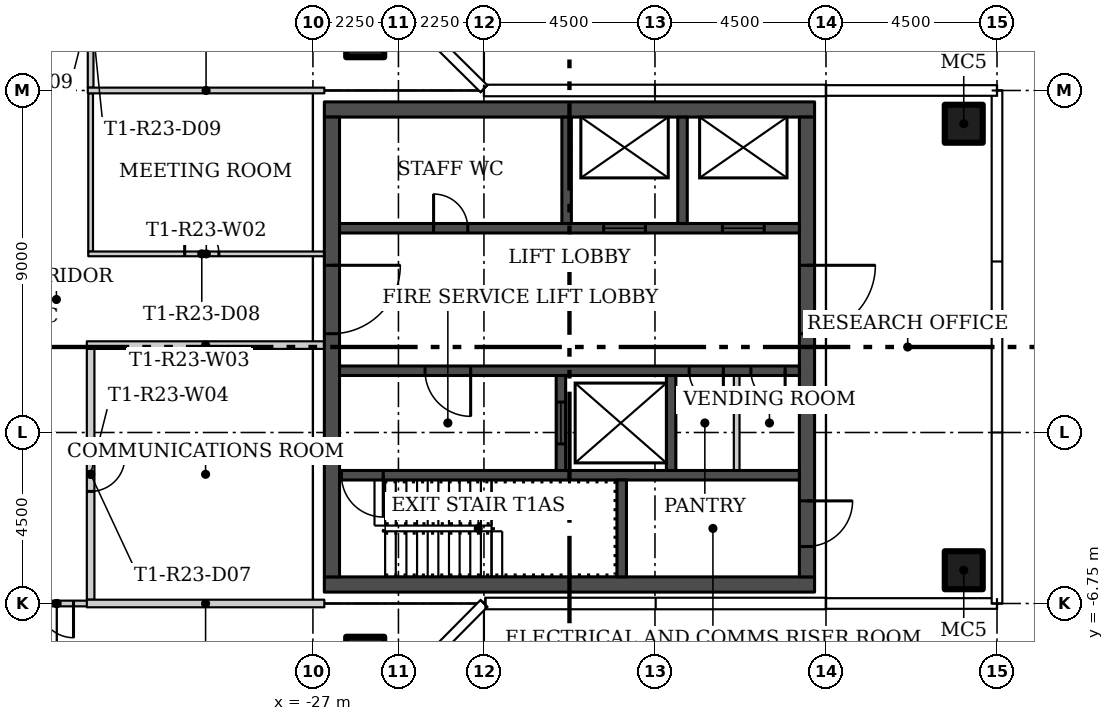
"""IFC4 building model, lengths in metres.
Left out: names, types, materials, properties, quantities, classifications, styles, units other than length and angle.
Written with IfcOpenShell. Run it as: python <this file> out.ifc"""

import sys

from ifc_helpers import new_model, si_unit, direction, frame, frame_2d, origin, origin_2d, place, context, subcontext, project, spatial, rectangle, hollow_rectangle, extrude, element, fill, save


model = new_model("IFC4")
c1 = context("Model", 3, precision=1e-05, world=origin(), true_north=direction((0.0, 1.0)))
c2 = subcontext(c1, "Body", "Model", "MODEL_VIEW")
j1 = project(units=[si_unit("LENGTHUNIT", "METRE"), si_unit("PLANEANGLEUNIT", "RADIAN")], contexts=[c1])
p1 = place(None, origin())
s1 = spatial("IfcSite", under=j1, at=p1, CompositionType="ELEMENT")
p2 = place(p1, origin())
s2 = spatial("IfcBuilding", under=s1, at=p2, CompositionType="ELEMENT")
p3 = place(p2, frame((0.0, 0.0, 210.0)))
s3 = spatial("IfcBuildingStorey", under=s2, at=p3, CompositionType="ELEMENT", Elevation=210.0)
for number, where in (
    (1, (-25.625, 8.125, 0.0)),
    (2, (-25.625, -8.125, 0.0)),
    (3, (-9.875, -5.875, 0.0)),
    (4, (-9.875, 5.875, 0.0)),
):
    element("IfcColumn", number, at=place(p3, frame(where)), inside=s3, PredefinedType="COLUMN", context=c2, shape_type="SweptSolid", body=[
        extrude(hollow_rectangle(XDim=1.0, YDim=1.0, WallThickness=0.04, at=origin_2d()), origin(), (0.0, 0.0, 1.0), 3.55),
    ])
p4 = place(p3, frame((-32.85, 6.675, 0.0), z_axis=(0.0, 0.0, 1.0), x_axis=(0.0, -1.0, 0.0)))
e5 = element("IfcWall", 5, at=p4, inside=s3, PredefinedType="PARTITIONING", context=c2, shape_type="SweptSolid", body=[
    extrude(rectangle(XDim=4.162, YDim=0.125, at=frame_2d((2.081, 0.0))), origin(), (0.0, 0.0, 1.0), 3.55),
])
p5 = place(p3, frame((-32.912, 2.45, 0.0)))
e6 = element("IfcWall", 6, at=p5, inside=s3, PredefinedType="PARTITIONING", context=c2, shape_type="SweptSolid", body=[
    extrude(rectangle(XDim=6.212, YDim=0.125, at=frame_2d((3.106, 0.0))), origin(), (0.0, 0.0, 1.0), 3.55),
])
p6 = place(p5, frame((2.537, 0.0, 0.0)))
e7 = element("IfcOpeningElement", 7, at=p6, cuts=e6, PredefinedType="OPENING", context=c2, shape_type="SweptSolid", body=[
    extrude(rectangle(XDim=0.9, YDim=2.1, at=frame_2d((0.45, 1.05))), frame((0.0, 0.073, 0.0), z_axis=(0.0, -1.0, 0.0), x_axis=(1.0, 0.0, 0.0)), (0.0, 0.0, 1.0), 0.145),
])
p7 = place(p3, frame((-26.7, 0.05, 0.0), z_axis=(0.0, 0.0, 1.0), x_axis=(-1.0, 0.0, 0.0)))
e8 = element("IfcWall", 8, at=p7, inside=s3, PredefinedType="PARTITIONING", context=c2, shape_type="SweptSolid", body=[
    extrude(rectangle(XDim=6.25, YDim=0.2, at=frame_2d((3.125, 0.0))), origin(), (0.0, 0.0, 1.0), 3.55),
])
p8 = place(p3, frame((-32.85, -0.05, 0.0), z_axis=(0.0, 0.0, 1.0), x_axis=(0.0, -1.0, 0.0)))
e9 = element("IfcWall", 9, at=p8, inside=s3, PredefinedType="PARTITIONING", context=c2, shape_type="SweptSolid", body=[
    extrude(rectangle(XDim=6.6, YDim=0.2, at=frame_2d((3.3, 0.0))), origin(), (0.0, 0.0, 1.0), 3.55),
])
p9 = place(p8, frame((2.85, 0.0, 0.0)))
e10 = element("IfcOpeningElement", 10, at=p9, cuts=e9, PredefinedType="OPENING", context=c2, shape_type="SweptSolid", body=[
    extrude(rectangle(XDim=0.9, YDim=2.1, at=frame_2d((0.45, 1.05))), frame((0.0, 0.11, 0.0), z_axis=(0.0, -1.0, 0.0), x_axis=(1.0, 0.0, 0.0)), (0.0, 0.0, 1.0), 0.22),
])
p10 = place(p3, frame((-32.85, 11.175, 0.0), z_axis=(0.0, 0.0, 1.0), x_axis=(0.0, -1.0, 0.0)))
e11 = element("IfcWall", 11, at=p10, inside=s3, PredefinedType="PARTITIONING", context=c2, shape_type="SweptSolid", body=[
    extrude(rectangle(XDim=4.35, YDim=0.15, at=frame_2d((2.175, 0.0))), origin(), (0.0, 0.0, 1.0), 3.55),
])
p11 = place(p10, frame((1.725, 0.0, 0.0)))
e12 = element("IfcOpeningElement", 12, at=p11, cuts=e11, PredefinedType="OPENING", context=c2, shape_type="SweptSolid", body=[
    extrude(rectangle(XDim=0.9, YDim=2.1, at=frame_2d((0.45, 1.05))), frame((0.0, 0.085, 0.0), z_axis=(0.0, -1.0, 0.0), x_axis=(1.0, 0.0, 0.0)), (0.0, 0.0, 1.0), 0.17),
])
p12 = place(p3, frame((-32.75, -6.75, 0.0), z_axis=(0.0, 0.0, 1.0), x_axis=(-1.0, 0.0, 0.0)))
e13 = element("IfcWall", 13, at=p12, inside=s3, PredefinedType="PARTITIONING", context=c2, shape_type="SweptSolid", body=[
    extrude(rectangle(XDim=1.963, YDim=0.15, at=frame_2d((0.982, 0.0))), origin(), (0.0, 0.0, 1.0), 3.55),
])
p13 = place(p12, frame((0.55, 0.0, 0.0)))
e14 = element("IfcOpeningElement", 14, at=p13, cuts=e13, PredefinedType="OPENING", context=c2, shape_type="SweptSolid", body=[
    extrude(rectangle(XDim=0.9, YDim=2.1, at=frame_2d((0.45, 1.05))), frame((0.0, 0.085, 0.0), z_axis=(0.0, -1.0, 0.0), x_axis=(1.0, 0.0, 0.0)), (0.0, 0.0, 1.0), 0.17),
])
p14 = place(p3, frame((-26.7, 6.75, 0.0), z_axis=(0.0, 0.0, 1.0), x_axis=(-1.0, 0.0, 0.0)))
e15 = element("IfcWall", 15, at=p14, inside=s3, PredefinedType="PARTITIONING", context=c2, shape_type="SweptSolid", body=[
    extrude(rectangle(XDim=6.225, YDim=0.15, at=frame_2d((3.112, 0.0))), origin(), (0.0, 0.0, 1.0), 3.55),
])
p15 = place(p3, frame((-32.95, -6.75, 0.0)))
e16 = element("IfcWall", 16, at=p15, inside=s3, PredefinedType="PARTITIONING", context=c2, shape_type="SweptSolid", body=[
    extrude(rectangle(XDim=6.25, YDim=0.2, at=frame_2d((3.125, 0.0))), origin(), (0.0, 0.0, 1.0), 3.55),
])
for number, where in (
    (17, (-26.7, -6.25, 0.0)),
    (18, (-26.7, 6.25, 0.0)),
):
    element("IfcWall", number, at=place(p3, frame(where)), inside=s3, PredefinedType="SHEAR", context=c2, shape_type="SweptSolid", body=[
        extrude(rectangle(XDim=12.9, YDim=0.4, at=frame_2d((6.45, 0.0))), origin(), (0.0, 0.0, 1.0), 3.55),
    ])
p16 = place(p3, frame((-26.5, 6.05, 0.0), z_axis=(0.0, 0.0, 1.0), x_axis=(0.0, -1.0, 0.0)))
e19 = element("IfcWall", 19, at=p16, inside=s3, PredefinedType="SHEAR", context=c2, shape_type="SweptSolid", body=[
    extrude(rectangle(XDim=12.1, YDim=0.4, at=frame_2d((6.05, 0.0))), origin(), (0.0, 0.0, 1.0), 3.55),
])
p17 = place(p16, frame((3.9, 0.0, 0.0)))
e20 = element("IfcOpeningElement", 20, at=p17, cuts=e19, PredefinedType="OPENING", context=c2, shape_type="SweptSolid", body=[
    extrude(rectangle(XDim=1.8, YDim=2.4, at=frame_2d((0.9, 1.2))), frame((0.0, 0.21, 0.0), z_axis=(0.0, -1.0, 0.0), x_axis=(1.0, 0.0, 0.0)), (0.0, 0.0, 1.0), 0.42),
])
p18 = place(p3, frame((-14.0, 6.05, 0.0), z_axis=(0.0, 0.0, 1.0), x_axis=(0.0, -1.0, 0.0)))
e21 = element("IfcWall", 21, at=p18, inside=s3, PredefinedType="SHEAR", context=c2, shape_type="SweptSolid", body=[
    extrude(rectangle(XDim=12.1, YDim=0.4, at=frame_2d((6.05, 0.0))), origin(), (0.0, 0.0, 1.0), 3.55),
])
p19 = place(p18, frame((10.1, 0.0, 0.0)))
e22 = element("IfcOpeningElement", 22, at=p19, cuts=e21, PredefinedType="OPENING", context=c2, shape_type="SweptSolid", body=[
    extrude(rectangle(XDim=1.2, YDim=2.1, at=frame_2d((0.6, 1.05))), frame((0.0, 0.21, 0.0), z_axis=(0.0, -1.0, 0.0), x_axis=(1.0, 0.0, 0.0)), (0.0, 0.0, 1.0), 0.42),
])
p20 = place(p18, frame((3.9, 0.0, 0.0)))
e23 = element("IfcOpeningElement", 23, at=p20, cuts=e21, PredefinedType="OPENING", context=c2, shape_type="SweptSolid", body=[
    extrude(rectangle(XDim=1.8, YDim=2.4, at=frame_2d((0.9, 1.2))), frame((0.0, 0.21, 0.0), z_axis=(0.0, -1.0, 0.0), x_axis=(1.0, 0.0, 0.0)), (0.0, 0.0, 1.0), 0.42),
])
p21 = place(p3, frame((-14.2, -3.375, 0.0), z_axis=(0.0, 0.0, 1.0), x_axis=(-1.0, 0.0, 0.0)))
e24 = element("IfcWall", 24, at=p21, inside=s3, PredefinedType="SHEAR", context=c2, shape_type="SweptSolid", body=[
    extrude(rectangle(XDim=12.1, YDim=0.25, at=frame_2d((6.05, 0.0))), origin(), (0.0, 0.0, 1.0), 3.55),
])
p22 = place(p21, frame((10.95, 0.0, 0.0)))
e25 = element("IfcOpeningElement", 25, at=p22, cuts=e24, PredefinedType="OPENING", context=c2, shape_type="SweptSolid", body=[
    extrude(rectangle(XDim=1.1, YDim=2.1, at=frame_2d((0.55, 1.05))), frame((0.0, 0.135, 0.0), z_axis=(0.0, -1.0, 0.0), x_axis=(1.0, 0.0, 0.0)), (0.0, 0.0, 1.0), 0.27),
])
p23 = place(p3, frame((-18.875, -6.05, 0.0), z_axis=(0.0, 0.0, 1.0), x_axis=(0.0, 1.0, 0.0)))
e26 = element("IfcWall", 26, at=p23, inside=s3, PredefinedType="SHEAR", context=c2, shape_type="SweptSolid", body=[
    extrude(rectangle(XDim=2.55, YDim=0.25, at=frame_2d((1.275, 0.0))), origin(), (0.0, 0.0, 1.0), 3.55),
])
p24 = place(p3, frame((-14.2, -0.625, 0.0), z_axis=(0.0, 0.0, 1.0), x_axis=(-1.0, 0.0, 0.0)))
e27 = element("IfcWall", 27, at=p24, inside=s3, PredefinedType="SHEAR", context=c2, shape_type="SweptSolid", body=[
    extrude(rectangle(XDim=12.1, YDim=0.25, at=frame_2d((6.05, 0.0))), origin(), (0.0, 0.0, 1.0), 3.55),
])
p25 = place(p24, frame((8.65, 0.0, 0.0)))
e28 = element("IfcOpeningElement", 28, at=p25, cuts=e27, PredefinedType="OPENING", context=c2, shape_type="SweptSolid", body=[
    extrude(rectangle(XDim=1.2, YDim=2.1, at=frame_2d((0.6, 1.05))), frame((0.0, 0.135, 0.0), z_axis=(0.0, -1.0, 0.0), x_axis=(1.0, 0.0, 0.0)), (0.0, 0.0, 1.0), 0.27),
])
p26 = place(p24, frame((2.0, 0.0, 0.0)))
e29 = element("IfcOpeningElement", 29, at=p26, cuts=e27, PredefinedType="OPENING", context=c2, shape_type="SweptSolid", body=[
    extrude(rectangle(XDim=0.9, YDim=2.1, at=frame_2d((0.45, 1.05))), frame((0.0, 0.135, 0.0), z_axis=(0.0, -1.0, 0.0), x_axis=(1.0, 0.0, 0.0)), (0.0, 0.0, 1.0), 0.27),
])
p27 = place(p24, frame((0.375, 0.0, 0.0)))
e30 = element("IfcOpeningElement", 30, at=p27, cuts=e27, PredefinedType="OPENING", context=c2, shape_type="SweptSolid", body=[
    extrude(rectangle(XDim=0.9, YDim=2.1, at=frame_2d((0.45, 1.05))), frame((0.0, 0.135, 0.0), z_axis=(0.0, -1.0, 0.0), x_axis=(1.0, 0.0, 0.0)), (0.0, 0.0, 1.0), 0.27),
])
p28 = place(p3, frame((-20.475, -3.25, 0.0), z_axis=(0.0, 0.0, 1.0), x_axis=(0.0, 1.0, 0.0)))
e31 = element("IfcWall", 31, at=p28, inside=s3, PredefinedType="SHEAR", context=c2, shape_type="SweptSolid", body=[
    extrude(rectangle(XDim=2.5, YDim=0.25, at=frame_2d((1.25, 0.0))), origin(), (0.0, 0.0, 1.0), 3.55),
])
p29 = place(p28, frame((0.7, 0.0, 0.0)))
e32 = element("IfcOpeningElement", 32, at=p29, cuts=e31, PredefinedType="OPENING", context=c2, shape_type="SweptSolid", body=[
    extrude(rectangle(XDim=1.1, YDim=2.1, at=frame_2d((0.55, 1.05))), frame((0.0, 0.135, 0.0), z_axis=(0.0, -1.0, 0.0), x_axis=(1.0, 0.0, 0.0)), (0.0, 0.0, 1.0), 0.27),
])
p30 = place(p3, frame((-17.575, -3.25, 0.0), z_axis=(0.0, 0.0, 1.0), x_axis=(0.0, 1.0, 0.0)))
e33 = element("IfcWall", 33, at=p30, inside=s3, PredefinedType="SHEAR", context=c2, shape_type="SweptSolid", body=[
    extrude(rectangle(XDim=2.5, YDim=0.25, at=frame_2d((1.25, 0.0))), origin(), (0.0, 0.0, 1.0), 3.55),
])
p31 = place(p3, frame((-15.85, -3.25, 0.0), z_axis=(0.0, 0.0, 1.0), x_axis=(0.0, 1.0, 0.0)))
e34 = element("IfcWall", 34, at=p31, inside=s3, PredefinedType="PARTITIONING", context=c2, shape_type="SweptSolid", body=[
    extrude(rectangle(XDim=2.5, YDim=0.15, at=frame_2d((1.25, 0.0))), origin(), (0.0, 0.0, 1.0), 3.55),
])
p32 = place(p3, frame((-26.3, 3.125, 0.0)))
e35 = element("IfcWall", 35, at=p32, inside=s3, PredefinedType="SHEAR", context=c2, shape_type="SweptSolid", body=[
    extrude(rectangle(XDim=12.1, YDim=0.25, at=frame_2d((6.05, 0.0))), origin(), (0.0, 0.0, 1.0), 3.55),
])
p33 = place(p32, frame((6.95, 0.0, 0.0)))
e36 = element("IfcOpeningElement", 36, at=p33, cuts=e35, PredefinedType="OPENING", context=c2, shape_type="SweptSolid", body=[
    extrude(rectangle(XDim=1.1, YDim=2.1, at=frame_2d((0.55, 1.05))), frame((0.0, 0.135, 0.0), z_axis=(0.0, -1.0, 0.0), x_axis=(1.0, 0.0, 0.0)), (0.0, 0.0, 1.0), 0.27),
])
p34 = place(p32, frame((10.075, 0.0, 0.0)))
e37 = element("IfcOpeningElement", 37, at=p34, cuts=e35, PredefinedType="OPENING", context=c2, shape_type="SweptSolid", body=[
    extrude(rectangle(XDim=1.1, YDim=2.1, at=frame_2d((0.55, 1.05))), frame((0.0, 0.135, 0.0), z_axis=(0.0, -1.0, 0.0), x_axis=(1.0, 0.0, 0.0)), (0.0, 0.0, 1.0), 0.27),
])
p35 = place(p32, frame((2.475, 0.0, 0.0)))
e38 = element("IfcOpeningElement", 38, at=p35, cuts=e35, PredefinedType="OPENING", context=c2, shape_type="SweptSolid", body=[
    extrude(rectangle(XDim=0.9, YDim=2.1, at=frame_2d((0.45, 1.05))), frame((0.0, 0.135, 0.0), z_axis=(0.0, -1.0, 0.0), x_axis=(1.0, 0.0, 0.0)), (0.0, 0.0, 1.0), 0.27),
])
for number, where, z_axis, x_axis in (
    (39, (-20.325, 3.25, 0.0), (0.0, 0.0, 1.0), (0.0, 1.0, 0.0)),
    (40, (-17.275, 3.25, 0.0), (0.0, 0.0, 1.0), (0.0, 1.0, 0.0)),
):
    element("IfcWall", number, at=place(p3, frame(where, z_axis=z_axis, x_axis=x_axis)), inside=s3, PredefinedType="SHEAR", context=c2, shape_type="SweptSolid", body=[
        extrude(rectangle(XDim=2.8, YDim=0.25, at=frame_2d((1.4, 0.0))), origin(), (0.0, 0.0, 1.0), 3.55),
    ])
p36 = place(p13, origin())
e41 = element("IfcDoor", 41, at=p36, inside=s3, OperationType="SINGLE_SWING_LEFT", PredefinedType="DOOR", context=c2, shape_type="SweptSolid", body=[
    extrude(rectangle(XDim=0.9, YDim=2.1, at=frame_2d((0.45, 1.05))), frame((0.0, 0.025, 0.0), z_axis=(0.0, -1.0, 0.0), x_axis=(1.0, 0.0, 0.0)), (0.0, 0.0, 1.0), 0.05),
])
fill(e14, e41)
p37 = place(p9, origin())
e42 = element("IfcDoor", 42, at=p37, inside=s3, OperationType="SINGLE_SWING_LEFT", PredefinedType="DOOR", context=c2, shape_type="SweptSolid", body=[
    extrude(rectangle(XDim=0.9, YDim=2.1, at=frame_2d((0.45, 1.05))), frame((0.0, 0.025, 0.0), z_axis=(0.0, -1.0, 0.0), x_axis=(1.0, 0.0, 0.0)), (0.0, 0.0, 1.0), 0.05),
])
fill(e10, e42)
p38 = place(p6, origin())
e43 = element("IfcDoor", 43, at=p38, inside=s3, OperationType="SINGLE_SWING_RIGHT", PredefinedType="DOOR", context=c2, shape_type="SweptSolid", body=[
    extrude(rectangle(XDim=0.9, YDim=2.1, at=frame_2d((0.45, 1.05))), frame((0.0, 0.025, 0.0), z_axis=(0.0, -1.0, 0.0), x_axis=(1.0, 0.0, 0.0)), (0.0, 0.0, 1.0), 0.05),
])
fill(e7, e43)
p39 = place(p17, origin())
e44 = element("IfcDoor", 44, at=p39, inside=s3, OperationType="DOUBLE_DOOR_SINGLE_SWING", PredefinedType="DOOR", context=c2, shape_type="SweptSolid", body=[
    extrude(rectangle(XDim=1.8, YDim=2.4, at=frame_2d((0.9, 1.2))), frame((0.0, 0.025, 0.0), z_axis=(0.0, -1.0, 0.0), x_axis=(1.0, 0.0, 0.0)), (0.0, 0.0, 1.0), 0.05),
])
fill(e20, e44)
p40 = place(p19, origin())
e45 = element("IfcDoor", 45, at=p40, inside=s3, OperationType="SINGLE_SWING_RIGHT", PredefinedType="DOOR", context=c2, shape_type="SweptSolid", body=[
    extrude(rectangle(XDim=1.2, YDim=2.1, at=frame_2d((0.6, 1.05))), frame((0.0, 0.025, 0.0), z_axis=(0.0, -1.0, 0.0), x_axis=(1.0, 0.0, 0.0)), (0.0, 0.0, 1.0), 0.05),
])
fill(e22, e45)
p41 = place(p20, origin())
e46 = element("IfcDoor", 46, at=p41, inside=s3, OperationType="DOUBLE_DOOR_SINGLE_SWING", PredefinedType="DOOR", context=c2, shape_type="SweptSolid", body=[
    extrude(rectangle(XDim=1.8, YDim=2.4, at=frame_2d((0.9, 1.2))), frame((0.0, 0.025, 0.0), z_axis=(0.0, -1.0, 0.0), x_axis=(1.0, 0.0, 0.0)), (0.0, 0.0, 1.0), 0.05),
])
fill(e23, e46)
p42 = place(p22, origin())
e47 = element("IfcDoor", 47, at=p42, inside=s3, OperationType="SINGLE_SWING_RIGHT", PredefinedType="DOOR", context=c2, shape_type="SweptSolid", body=[
    extrude(rectangle(XDim=1.1, YDim=2.1, at=frame_2d((0.55, 1.05))), frame((0.0, 0.025, 0.0), z_axis=(0.0, -1.0, 0.0), x_axis=(1.0, 0.0, 0.0)), (0.0, 0.0, 1.0), 0.05),
])
fill(e25, e47)
p43 = place(p25, origin())
e48 = element("IfcDoor", 48, at=p43, inside=s3, OperationType="SINGLE_SWING_RIGHT", PredefinedType="DOOR", context=c2, shape_type="SweptSolid", body=[
    extrude(rectangle(XDim=1.2, YDim=2.1, at=frame_2d((0.6, 1.05))), frame((0.0, 0.025, 0.0), z_axis=(0.0, -1.0, 0.0), x_axis=(1.0, 0.0, 0.0)), (0.0, 0.0, 1.0), 0.05),
])
fill(e28, e48)
p44 = place(p26, origin())
e49 = element("IfcDoor", 49, at=p44, inside=s3, OperationType="SINGLE_SWING_LEFT", PredefinedType="DOOR", context=c2, shape_type="SweptSolid", body=[
    extrude(rectangle(XDim=0.9, YDim=2.1, at=frame_2d((0.45, 1.05))), frame((0.0, 0.025, 0.0), z_axis=(0.0, -1.0, 0.0), x_axis=(1.0, 0.0, 0.0)), (0.0, 0.0, 1.0), 0.05),
])
fill(e29, e49)
p45 = place(p27, origin())
e50 = element("IfcDoor", 50, at=p45, inside=s3, OperationType="SINGLE_SWING_LEFT", PredefinedType="DOOR", context=c2, shape_type="SweptSolid", body=[
    extrude(rectangle(XDim=0.9, YDim=2.1, at=frame_2d((0.45, 1.05))), frame((0.0, 0.025, 0.0), z_axis=(0.0, -1.0, 0.0), x_axis=(1.0, 0.0, 0.0)), (0.0, 0.0, 1.0), 0.05),
])
fill(e30, e50)
p46 = place(p29, origin())
e51 = element("IfcDoor", 51, at=p46, inside=s3, OperationType="SLIDING_TO_LEFT", PredefinedType="DOOR", context=c2, shape_type="SweptSolid", body=[
    extrude(rectangle(XDim=1.1, YDim=2.1, at=frame_2d((0.55, 1.05))), frame((0.0, 0.025, 0.0), z_axis=(0.0, -1.0, 0.0), x_axis=(1.0, 0.0, 0.0)), (0.0, 0.0, 1.0), 0.05),
])
fill(e32, e51)
p47 = place(p33, origin())
e52 = element("IfcDoor", 52, at=p47, inside=s3, OperationType="SLIDING_TO_LEFT", PredefinedType="DOOR", context=c2, shape_type="SweptSolid", body=[
    extrude(rectangle(XDim=1.1, YDim=2.1, at=frame_2d((0.55, 1.05))), frame((0.0, 0.025, 0.0), z_axis=(0.0, -1.0, 0.0), x_axis=(1.0, 0.0, 0.0)), (0.0, 0.0, 1.0), 0.05),
])
fill(e36, e52)
p48 = place(p34, origin())
e53 = element("IfcDoor", 53, at=p48, inside=s3, OperationType="SLIDING_TO_LEFT", PredefinedType="DOOR", context=c2, shape_type="SweptSolid", body=[
    extrude(rectangle(XDim=1.1, YDim=2.1, at=frame_2d((0.55, 1.05))), frame((0.0, 0.025, 0.0), z_axis=(0.0, -1.0, 0.0), x_axis=(1.0, 0.0, 0.0)), (0.0, 0.0, 1.0), 0.05),
])
fill(e37, e53)
p49 = place(p35, origin())
e54 = element("IfcDoor", 54, at=p49, inside=s3, OperationType="SINGLE_SWING_LEFT", PredefinedType="DOOR", context=c2, shape_type="SweptSolid", body=[
    extrude(rectangle(XDim=0.9, YDim=2.1, at=frame_2d((0.45, 1.05))), frame((0.0, 0.025, 0.0), z_axis=(0.0, -1.0, 0.0), x_axis=(1.0, 0.0, 0.0)), (0.0, 0.0, 1.0), 0.05),
])
fill(e38, e54)
save(model, sys.argv[1])
